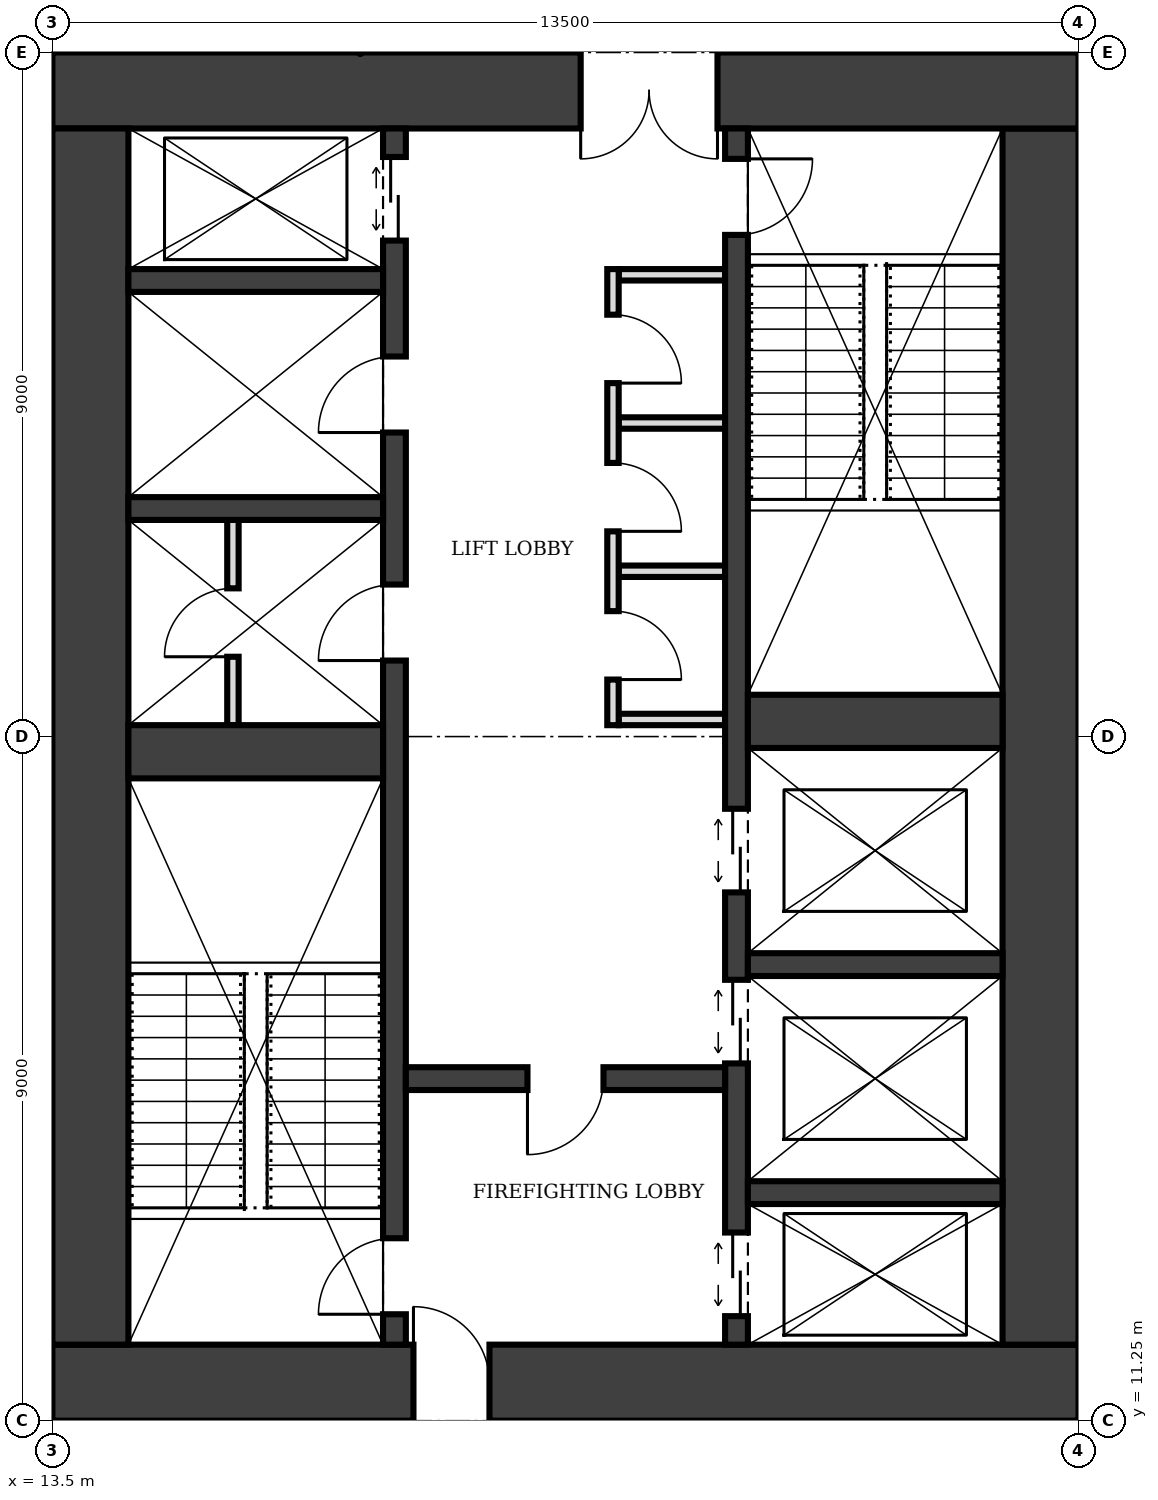
"""IFC4 building model, lengths in metres.
Left out: names, types, materials, properties, quantities, classifications, styles, units other than length and angle.
Written with IfcOpenShell. Run it as: python <this file> out.ifc"""

import sys

from ifc_helpers import new_model, si_unit, direction, frame, frame_2d, origin, place, context, subcontext, project, spatial, rectangle, extrude, element, fill, save


model = new_model("IFC4")
c1 = context("Model", 3, precision=1e-05, world=origin(), true_north=direction((0.0, 1.0)))
c2 = subcontext(c1, "Body", "Model", "MODEL_VIEW")
j1 = project(units=[si_unit("LENGTHUNIT", "METRE"), si_unit("PLANEANGLEUNIT", "RADIAN")], contexts=[c1])
p1 = place(None, origin())
s1 = spatial("IfcSite", under=j1, at=p1, CompositionType="ELEMENT")
p2 = place(p1, origin())
s2 = spatial("IfcBuilding", under=s1, at=p2, CompositionType="ELEMENT")
p3 = place(p2, frame((0.0, 0.0, 213.0)))
s3 = spatial("IfcBuildingStorey", under=s2, at=p3, CompositionType="ELEMENT", Elevation=213.0)
p4 = place(p3, frame((13.5, 11.75, 0.0), z_axis=(0.0, 0.0, 1.0), x_axis=(1.0, 0.0, 0.0)))
e1 = element("IfcWall", 1, at=p4, inside=s3, PredefinedType="SHEAR", context=c2, shape_type="SweptSolid", body=[
    extrude(rectangle(XDim=13.5, YDim=1.0, at=frame_2d((6.75, 0.0))), origin(), (0.0, 0.0, 1.0), 4.0),
])
p5 = place(p4, frame((4.75, 0.0, 0.0)))
e2 = element("IfcOpeningElement", 2, at=p5, cuts=e1, PredefinedType="OPENING", context=c2, shape_type="SweptSolid", body=[
    extrude(rectangle(XDim=1.0, YDim=2.1, at=frame_2d((0.5, 1.05))), frame((0.0, 0.51, 0.0), z_axis=(0.0, -1.0, 0.0), x_axis=(1.0, 0.0, 0.0)), (0.0, 0.0, 1.0), 1.02),
])
p6 = place(p3, frame((26.5, 12.25, 0.0), z_axis=(0.0, 0.0, 1.0), x_axis=(0.0, 1.0, 0.0)))
e3 = element("IfcWall", 3, at=p6, inside=s3, PredefinedType="SHEAR", context=c2, shape_type="SweptSolid", body=[
    extrude(rectangle(XDim=16.0, YDim=1.0, at=frame_2d((8.0, 0.0))), origin(), (0.0, 0.0, 1.0), 4.0),
])
p7 = place(p3, frame((27.0, 28.75, 0.0), z_axis=(0.0, 0.0, 1.0), x_axis=(-1.0, 0.0, 0.0)))
e4 = element("IfcWall", 4, at=p7, inside=s3, PredefinedType="SHEAR", context=c2, shape_type="SweptSolid", body=[
    extrude(rectangle(XDim=13.5, YDim=1.0, at=frame_2d((6.75, 0.0))), origin(), (0.0, 0.0, 1.0), 4.0),
])
p8 = place(p7, frame((4.75, 0.0, 0.0)))
e5 = element("IfcOpeningElement", 5, at=p8, cuts=e4, PredefinedType="OPENING", context=c2, shape_type="SweptSolid", body=[
    extrude(rectangle(XDim=1.8, YDim=2.1, at=frame_2d((0.9, 1.05))), frame((0.0, 0.51, 0.0), z_axis=(0.0, -1.0, 0.0), x_axis=(1.0, 0.0, 0.0)), (0.0, 0.0, 1.0), 1.02),
])
p9 = place(p3, frame((14.0, 28.25, 0.0), z_axis=(0.0, 0.0, 1.0), x_axis=(0.0, -1.0, 0.0)))
e6 = element("IfcWall", 6, at=p9, inside=s3, PredefinedType="SHEAR", context=c2, shape_type="SweptSolid", body=[
    extrude(rectangle(XDim=16.0, YDim=1.0, at=frame_2d((8.0, 0.0))), origin(), (0.0, 0.0, 1.0), 4.0),
])
p10 = place(p3, frame((18.0, 12.25, 0.0), z_axis=(0.0, 0.0, 1.0), x_axis=(0.0, 1.0, 0.0)))
e7 = element("IfcWall", 7, at=p10, inside=s3, PredefinedType="SHEAR", context=c2, shape_type="SweptSolid", body=[
    extrude(rectangle(XDim=16.0, YDim=0.3, at=frame_2d((8.0, 0.0))), origin(), (0.0, 0.0, 1.0), 4.0),
])
p11 = place(p10, frame((0.4, 0.0, 0.0)))
e8 = element("IfcOpeningElement", 8, at=p11, cuts=e7, PredefinedType="OPENING", context=c2, shape_type="SweptSolid", body=[
    extrude(rectangle(XDim=1.0, YDim=2.1, at=frame_2d((0.5, 1.05))), frame((0.0, 0.16, 0.0), z_axis=(0.0, -1.0, 0.0), x_axis=(1.0, 0.0, 0.0)), (0.0, 0.0, 1.0), 0.32),
])
p12 = place(p10, frame((14.525, 0.0, 0.0)))
e9 = element("IfcOpeningElement", 9, at=p12, cuts=e7, PredefinedType="OPENING", context=c2, shape_type="SweptSolid", body=[
    extrude(rectangle(XDim=1.1, YDim=2.1, at=frame_2d((0.55, 1.05))), frame((0.0, 0.16, 0.0), z_axis=(0.0, -1.0, 0.0), x_axis=(1.0, 0.0, 0.0)), (0.0, 0.0, 1.0), 0.32),
])
p13 = place(p10, frame((9.0, 0.0, 0.0)))
e10 = element("IfcOpeningElement", 10, at=p13, cuts=e7, PredefinedType="OPENING", context=c2, shape_type="SweptSolid", body=[
    extrude(rectangle(XDim=1.0, YDim=2.1, at=frame_2d((0.5, 1.05))), frame((0.0, 0.16, 0.0), z_axis=(0.0, -1.0, 0.0), x_axis=(1.0, 0.0, 0.0)), (0.0, 0.0, 1.0), 0.32),
])
p14 = place(p10, frame((12.0, 0.0, 0.0)))
e11 = element("IfcOpeningElement", 11, at=p14, cuts=e7, PredefinedType="OPENING", context=c2, shape_type="SweptSolid", body=[
    extrude(rectangle(XDim=1.0, YDim=2.1, at=frame_2d((0.5, 1.05))), frame((0.0, 0.16, 0.0), z_axis=(0.0, -1.0, 0.0), x_axis=(1.0, 0.0, 0.0)), (0.0, 0.0, 1.0), 0.32),
])
p15 = place(p3, frame((22.5, 12.25, 0.0), z_axis=(0.0, 0.0, 1.0), x_axis=(0.0, 1.0, 0.0)))
e12 = element("IfcWall", 12, at=p15, inside=s3, PredefinedType="SHEAR", context=c2, shape_type="SweptSolid", body=[
    extrude(rectangle(XDim=16.0, YDim=0.3, at=frame_2d((8.0, 0.0))), origin(), (0.0, 0.0, 1.0), 4.0),
])
p16 = place(p15, frame((14.6, 0.0, 0.0)))
e13 = element("IfcOpeningElement", 13, at=p16, cuts=e12, PredefinedType="OPENING", context=c2, shape_type="SweptSolid", body=[
    extrude(rectangle(XDim=1.0, YDim=2.1, at=frame_2d((0.5, 1.05))), frame((0.0, 0.16, 0.0), z_axis=(0.0, -1.0, 0.0), x_axis=(1.0, 0.0, 0.0)), (0.0, 0.0, 1.0), 0.32),
])
p17 = place(p15, frame((0.375, 0.0, 0.0)))
e14 = element("IfcOpeningElement", 14, at=p17, cuts=e12, PredefinedType="OPENING", context=c2, shape_type="SweptSolid", body=[
    extrude(rectangle(XDim=1.1, YDim=2.1, at=frame_2d((0.55, 1.05))), frame((0.0, 0.16, 0.0), z_axis=(0.0, -1.0, 0.0), x_axis=(1.0, 0.0, 0.0)), (0.0, 0.0, 1.0), 0.32),
])
p18 = place(p15, frame((3.7, 0.0, 0.0)))
e15 = element("IfcOpeningElement", 15, at=p18, cuts=e12, PredefinedType="OPENING", context=c2, shape_type="SweptSolid", body=[
    extrude(rectangle(XDim=1.1, YDim=2.1, at=frame_2d((0.55, 1.05))), frame((0.0, 0.16, 0.0), z_axis=(0.0, -1.0, 0.0), x_axis=(1.0, 0.0, 0.0)), (0.0, 0.0, 1.0), 0.32),
])
p19 = place(p15, frame((5.95, 0.0, 0.0)))
e16 = element("IfcOpeningElement", 16, at=p19, cuts=e12, PredefinedType="OPENING", context=c2, shape_type="SweptSolid", body=[
    extrude(rectangle(XDim=1.1, YDim=2.1, at=frame_2d((0.55, 1.05))), frame((0.0, 0.16, 0.0), z_axis=(0.0, -1.0, 0.0), x_axis=(1.0, 0.0, 0.0)), (0.0, 0.0, 1.0), 0.32),
])
p20 = place(p3, frame((14.5, 20.05, 0.0), z_axis=(0.0, 0.0, 1.0), x_axis=(1.0, 0.0, 0.0)))
e17 = element("IfcWall", 17, at=p20, inside=s3, PredefinedType="SHEAR", context=c2, shape_type="SweptSolid", body=[
    extrude(rectangle(XDim=3.35, YDim=0.7, at=frame_2d((1.675, 0.0))), origin(), (0.0, 0.0, 1.0), 4.0),
])
p21 = place(p3, frame((18.15, 15.75, 0.0), z_axis=(0.0, 0.0, 1.0), x_axis=(1.0, 0.0, 0.0)))
e18 = element("IfcWall", 18, at=p21, inside=s3, PredefinedType="SHEAR", context=c2, shape_type="SweptSolid", body=[
    extrude(rectangle(XDim=4.2, YDim=0.3, at=frame_2d((2.1, 0.0))), origin(), (0.0, 0.0, 1.0), 4.0),
])
p22 = place(p21, frame((1.6, 0.0, 0.0)))
e19 = element("IfcOpeningElement", 19, at=p22, cuts=e18, PredefinedType="OPENING", context=c2, shape_type="SweptSolid", body=[
    extrude(rectangle(XDim=1.0, YDim=2.1, at=frame_2d((0.5, 1.05))), frame((0.0, 0.16, 0.0), z_axis=(0.0, -1.0, 0.0), x_axis=(1.0, 0.0, 0.0)), (0.0, 0.0, 1.0), 0.32),
])
for number, where, z_axis, x_axis in (
    (20, (22.65, 14.25, 0.0), (0.0, 0.0, 1.0), (1.0, 0.0, 0.0)),
    (21, (22.65, 17.25, 0.0), (0.0, 0.0, 1.0), (1.0, 0.0, 0.0)),
):
    element("IfcWall", number, at=place(p3, frame(where, z_axis=z_axis, x_axis=x_axis)), inside=s3, PredefinedType="SHEAR", context=c2, shape_type="SweptSolid", body=[
        extrude(rectangle(XDim=3.35, YDim=0.3, at=frame_2d((1.675, 0.0))), origin(), (0.0, 0.0, 1.0), 4.0),
    ])
p23 = place(p3, frame((22.65, 20.45, 0.0), z_axis=(0.0, 0.0, 1.0), x_axis=(1.0, 0.0, 0.0)))
e22 = element("IfcWall", 22, at=p23, inside=s3, PredefinedType="SHEAR", context=c2, shape_type="SweptSolid", body=[
    extrude(rectangle(XDim=3.35, YDim=0.7, at=frame_2d((1.675, 0.0))), origin(), (0.0, 0.0, 1.0), 4.0),
])
for number, where, z_axis, x_axis in (
    (23, (14.5, 23.25, 0.0), (0.0, 0.0, 1.0), (1.0, 0.0, 0.0)),
    (24, (14.5, 26.25, 0.0), (0.0, 0.0, 1.0), (1.0, 0.0, 0.0)),
):
    element("IfcWall", number, at=place(p3, frame(where, z_axis=z_axis, x_axis=x_axis)), inside=s3, PredefinedType="SHEAR", context=c2, shape_type="SweptSolid", body=[
        extrude(rectangle(XDim=3.35, YDim=0.3, at=frame_2d((1.675, 0.0))), origin(), (0.0, 0.0, 1.0), 4.0),
    ])
p24 = place(p3, frame((20.875, 20.4, 0.0), z_axis=(0.0, 0.0, 1.0), x_axis=(0.0, 1.0, 0.0)))
e25 = element("IfcWall", 25, at=p24, inside=s3, PredefinedType="PARTITIONING", context=c2, shape_type="SweptSolid", body=[
    extrude(rectangle(XDim=6.0, YDim=0.15, at=frame_2d((3.0, 0.0))), origin(), (0.0, 0.0, 1.0), 3.75),
])
p25 = place(p24, frame((0.6, 0.0, 0.0)))
e26 = element("IfcOpeningElement", 26, at=p25, cuts=e25, PredefinedType="OPENING", context=c2, shape_type="SweptSolid", body=[
    extrude(rectangle(XDim=0.9, YDim=2.1, at=frame_2d((0.45, 1.05))), frame((0.0, 0.085, 0.0), z_axis=(0.0, -1.0, 0.0), x_axis=(1.0, 0.0, 0.0)), (0.0, 0.0, 1.0), 0.17),
])
p26 = place(p24, frame((2.55, 0.0, 0.0)))
e27 = element("IfcOpeningElement", 27, at=p26, cuts=e25, PredefinedType="OPENING", context=c2, shape_type="SweptSolid", body=[
    extrude(rectangle(XDim=0.9, YDim=2.1, at=frame_2d((0.45, 1.05))), frame((0.0, 0.085, 0.0), z_axis=(0.0, -1.0, 0.0), x_axis=(1.0, 0.0, 0.0)), (0.0, 0.0, 1.0), 0.17),
])
p27 = place(p24, frame((4.5, 0.0, 0.0)))
e28 = element("IfcOpeningElement", 28, at=p27, cuts=e25, PredefinedType="OPENING", context=c2, shape_type="SweptSolid", body=[
    extrude(rectangle(XDim=0.9, YDim=2.1, at=frame_2d((0.45, 1.05))), frame((0.0, 0.085, 0.0), z_axis=(0.0, -1.0, 0.0), x_axis=(1.0, 0.0, 0.0)), (0.0, 0.0, 1.0), 0.17),
])
for number, where, z_axis, x_axis in (
    (29, (20.95, 20.475, 0.0), (0.0, 0.0, 1.0), (1.0, 0.0, 0.0)),
    (30, (20.95, 22.425, 0.0), (0.0, 0.0, 1.0), (1.0, 0.0, 0.0)),
    (31, (20.95, 24.375, 0.0), (0.0, 0.0, 1.0), (1.0, 0.0, 0.0)),
    (32, (20.95, 26.325, 0.0), (0.0, 0.0, 1.0), (1.0, 0.0, 0.0)),
):
    element("IfcWall", number, at=place(p3, frame(where, z_axis=z_axis, x_axis=x_axis)), inside=s3, PredefinedType="PARTITIONING", context=c2, shape_type="SweptSolid", body=[
        extrude(rectangle(XDim=1.4, YDim=0.15, at=frame_2d((0.7, 0.0))), origin(), (0.0, 0.0, 1.0), 3.75),
    ])
p28 = place(p3, frame((15.875, 20.4, 0.0), z_axis=(0.0, 0.0, 1.0), x_axis=(0.0, 1.0, 0.0)))
e33 = element("IfcWall", 33, at=p28, inside=s3, PredefinedType="PARTITIONING", context=c2, shape_type="SweptSolid", body=[
    extrude(rectangle(XDim=2.7, YDim=0.15, at=frame_2d((1.35, 0.0))), origin(), (0.0, 0.0, 1.0), 3.75),
])
p29 = place(p28, frame((0.9, 0.0, 0.0)))
e34 = element("IfcOpeningElement", 34, at=p29, cuts=e33, PredefinedType="OPENING", context=c2, shape_type="SweptSolid", body=[
    extrude(rectangle(XDim=0.9, YDim=2.1, at=frame_2d((0.45, 1.05))), frame((0.0, 0.085, 0.0), z_axis=(0.0, -1.0, 0.0), x_axis=(1.0, 0.0, 0.0)), (0.0, 0.0, 1.0), 0.17),
])
p30 = place(p5, origin())
e35 = element("IfcDoor", 35, at=p30, inside=s3, OperationType="SINGLE_SWING_LEFT", PredefinedType="DOOR", context=c2, shape_type="SweptSolid", body=[
    extrude(rectangle(XDim=1.0, YDim=2.1, at=frame_2d((0.5, 1.05))), frame((0.0, 0.025, 0.0), z_axis=(0.0, -1.0, 0.0), x_axis=(1.0, 0.0, 0.0)), (0.0, 0.0, 1.0), 0.05),
])
fill(e2, e35)
p31 = place(p8, origin())
e36 = element("IfcDoor", 36, at=p31, inside=s3, OperationType="DOUBLE_DOOR_SINGLE_SWING", PredefinedType="DOOR", context=c2, shape_type="SweptSolid", body=[
    extrude(rectangle(XDim=1.8, YDim=2.1, at=frame_2d((0.9, 1.05))), frame((0.0, 0.025, 0.0), z_axis=(0.0, -1.0, 0.0), x_axis=(1.0, 0.0, 0.0)), (0.0, 0.0, 1.0), 0.05),
])
fill(e5, e36)
p32 = place(p22, frame((1.0, 0.0, 0.0), z_axis=(0.0, 0.0, 1.0), x_axis=(-1.0, 0.0, 0.0)))
e37 = element("IfcDoor", 37, at=p32, inside=s3, OperationType="SINGLE_SWING_RIGHT", PredefinedType="DOOR", context=c2, shape_type="SweptSolid", body=[
    extrude(rectangle(XDim=1.0, YDim=2.1, at=frame_2d((0.5, 1.05))), frame((0.0, 0.025, 0.0), z_axis=(0.0, -1.0, 0.0), x_axis=(1.0, 0.0, 0.0)), (0.0, 0.0, 1.0), 0.05),
])
fill(e19, e37)
p33 = place(p11, origin())
e38 = element("IfcDoor", 38, at=p33, inside=s3, OperationType="SINGLE_SWING_LEFT", PredefinedType="DOOR", context=c2, shape_type="SweptSolid", body=[
    extrude(rectangle(XDim=1.0, YDim=2.1, at=frame_2d((0.5, 1.05))), frame((0.0, 0.025, 0.0), z_axis=(0.0, -1.0, 0.0), x_axis=(1.0, 0.0, 0.0)), (0.0, 0.0, 1.0), 0.05),
])
fill(e8, e38)
p34 = place(p16, frame((1.0, 0.0, 0.0), z_axis=(0.0, 0.0, 1.0), x_axis=(-1.0, 0.0, 0.0)))
e39 = element("IfcDoor", 39, at=p34, inside=s3, OperationType="SINGLE_SWING_LEFT", PredefinedType="DOOR", context=c2, shape_type="SweptSolid", body=[
    extrude(rectangle(XDim=1.0, YDim=2.1, at=frame_2d((0.5, 1.05))), frame((0.0, 0.025, 0.0), z_axis=(0.0, -1.0, 0.0), x_axis=(1.0, 0.0, 0.0)), (0.0, 0.0, 1.0), 0.05),
])
fill(e13, e39)
p35 = place(p17, origin())
e40 = element("IfcDoor", 40, at=p35, inside=s3, OperationType="DOUBLE_DOOR_SLIDING", PredefinedType="DOOR", context=c2, shape_type="SweptSolid", body=[
    extrude(rectangle(XDim=1.1, YDim=2.1, at=frame_2d((0.55, 1.05))), frame((0.0, 0.025, 0.0), z_axis=(0.0, -1.0, 0.0), x_axis=(1.0, 0.0, 0.0)), (0.0, 0.0, 1.0), 0.05),
])
fill(e14, e40)
p36 = place(p12, origin())
e41 = element("IfcDoor", 41, at=p36, inside=s3, OperationType="DOUBLE_DOOR_SLIDING", PredefinedType="DOOR", context=c2, shape_type="SweptSolid", body=[
    extrude(rectangle(XDim=1.1, YDim=2.1, at=frame_2d((0.55, 1.05))), frame((0.0, 0.025, 0.0), z_axis=(0.0, -1.0, 0.0), x_axis=(1.0, 0.0, 0.0)), (0.0, 0.0, 1.0), 0.05),
])
fill(e9, e41)
p37 = place(p18, origin())
e42 = element("IfcDoor", 42, at=p37, inside=s3, OperationType="DOUBLE_DOOR_SLIDING", PredefinedType="DOOR", context=c2, shape_type="SweptSolid", body=[
    extrude(rectangle(XDim=1.1, YDim=2.1, at=frame_2d((0.55, 1.05))), frame((0.0, 0.025, 0.0), z_axis=(0.0, -1.0, 0.0), x_axis=(1.0, 0.0, 0.0)), (0.0, 0.0, 1.0), 0.05),
])
fill(e15, e42)
p38 = place(p19, origin())
e43 = element("IfcDoor", 43, at=p38, inside=s3, OperationType="DOUBLE_DOOR_SLIDING", PredefinedType="DOOR", context=c2, shape_type="SweptSolid", body=[
    extrude(rectangle(XDim=1.1, YDim=2.1, at=frame_2d((0.55, 1.05))), frame((0.0, 0.025, 0.0), z_axis=(0.0, -1.0, 0.0), x_axis=(1.0, 0.0, 0.0)), (0.0, 0.0, 1.0), 0.05),
])
fill(e16, e43)
p39 = place(p25, frame((0.9, 0.0, 0.0), z_axis=(0.0, 0.0, 1.0), x_axis=(-1.0, 0.0, 0.0)))
e44 = element("IfcDoor", 44, at=p39, inside=s3, OperationType="SINGLE_SWING_RIGHT", PredefinedType="DOOR", context=c2, shape_type="SweptSolid", body=[
    extrude(rectangle(XDim=0.9, YDim=2.1, at=frame_2d((0.45, 1.05))), frame((0.0, 0.025, 0.0), z_axis=(0.0, -1.0, 0.0), x_axis=(1.0, 0.0, 0.0)), (0.0, 0.0, 1.0), 0.05),
])
fill(e26, e44)
p40 = place(p26, frame((0.9, 0.0, 0.0), z_axis=(0.0, 0.0, 1.0), x_axis=(-1.0, 0.0, 0.0)))
e45 = element("IfcDoor", 45, at=p40, inside=s3, OperationType="SINGLE_SWING_RIGHT", PredefinedType="DOOR", context=c2, shape_type="SweptSolid", body=[
    extrude(rectangle(XDim=0.9, YDim=2.1, at=frame_2d((0.45, 1.05))), frame((0.0, 0.025, 0.0), z_axis=(0.0, -1.0, 0.0), x_axis=(1.0, 0.0, 0.0)), (0.0, 0.0, 1.0), 0.05),
])
fill(e27, e45)
p41 = place(p27, frame((0.9, 0.0, 0.0), z_axis=(0.0, 0.0, 1.0), x_axis=(-1.0, 0.0, 0.0)))
e46 = element("IfcDoor", 46, at=p41, inside=s3, OperationType="SINGLE_SWING_RIGHT", PredefinedType="DOOR", context=c2, shape_type="SweptSolid", body=[
    extrude(rectangle(XDim=0.9, YDim=2.1, at=frame_2d((0.45, 1.05))), frame((0.0, 0.025, 0.0), z_axis=(0.0, -1.0, 0.0), x_axis=(1.0, 0.0, 0.0)), (0.0, 0.0, 1.0), 0.05),
])
fill(e28, e46)
p42 = place(p13, origin())
e47 = element("IfcDoor", 47, at=p42, inside=s3, OperationType="SINGLE_SWING_LEFT", PredefinedType="DOOR", context=c2, shape_type="SweptSolid", body=[
    extrude(rectangle(XDim=1.0, YDim=2.1, at=frame_2d((0.5, 1.05))), frame((0.0, 0.025, 0.0), z_axis=(0.0, -1.0, 0.0), x_axis=(1.0, 0.0, 0.0)), (0.0, 0.0, 1.0), 0.05),
])
fill(e10, e47)
p43 = place(p29, origin())
e48 = element("IfcDoor", 48, at=p43, inside=s3, OperationType="SINGLE_SWING_LEFT", PredefinedType="DOOR", context=c2, shape_type="SweptSolid", body=[
    extrude(rectangle(XDim=0.9, YDim=2.1, at=frame_2d((0.45, 1.05))), frame((0.0, 0.025, 0.0), z_axis=(0.0, -1.0, 0.0), x_axis=(1.0, 0.0, 0.0)), (0.0, 0.0, 1.0), 0.05),
])
fill(e34, e48)
p44 = place(p14, origin())
e49 = element("IfcDoor", 49, at=p44, inside=s3, OperationType="SINGLE_SWING_LEFT", PredefinedType="DOOR", context=c2, shape_type="SweptSolid", body=[
    extrude(rectangle(XDim=1.0, YDim=2.1, at=frame_2d((0.5, 1.05))), frame((0.0, 0.025, 0.0), z_axis=(0.0, -1.0, 0.0), x_axis=(1.0, 0.0, 0.0)), (0.0, 0.0, 1.0), 0.05),
])
fill(e11, e49)
save(model, sys.argv[1])
